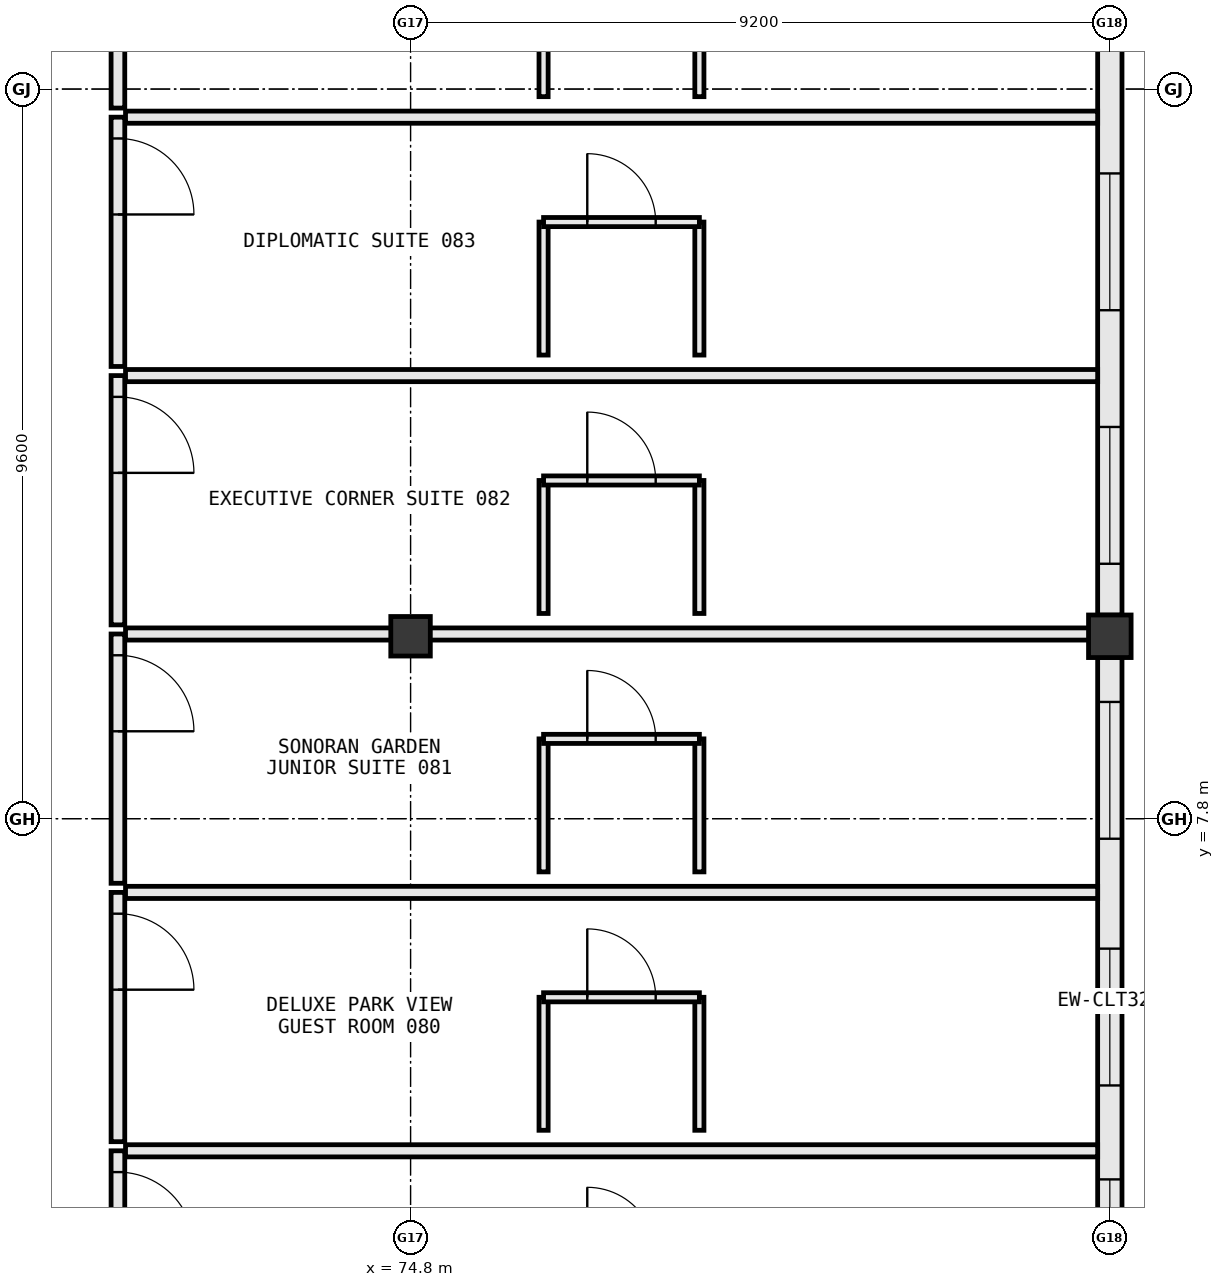
"""IFC4 building model, lengths in metres.
Left out: names, types, materials, properties, quantities, classifications, styles, units other than length and angle.
Written with IfcOpenShell. Run it as: python <this file> out.ifc"""

import sys

from ifc_helpers import new_model, si_unit, direction, frame, frame_2d, origin, origin_2d, place, context, subcontext, project, spatial, rectangle, extrude, element, fill, save


model = new_model("IFC4")
c1 = context("Model", 3, precision=1e-05, world=origin(), true_north=direction((0.0, 1.0)))
c2 = subcontext(c1, "Body", "Model", "MODEL_VIEW")
j1 = project(units=[si_unit("LENGTHUNIT", "METRE"), si_unit("PLANEANGLEUNIT", "RADIAN")], contexts=[c1])
p1 = place(None, origin())
s1 = spatial("IfcSite", under=j1, at=p1, CompositionType="ELEMENT")
p2 = place(p1, origin())
s2 = spatial("IfcBuilding", under=s1, at=p2, CompositionType="ELEMENT")
p3 = place(p2, frame((0.0, 0.0, 16.2)))
s3 = spatial("IfcBuildingStorey", under=s2, at=p3, CompositionType="ELEMENT", Elevation=16.2)
p4 = place(p3, frame((74.8, 10.2, 0.0), z_axis=(0.0, 0.0, 1.0), x_axis=(1.0, 0.0, 0.0)))
e1 = element("IfcColumn", 1, at=p4, inside=s3, PredefinedType="COLUMN", context=c2, shape_type="SweptSolid", body=[
    extrude(rectangle(XDim=0.52, YDim=0.52, at=origin_2d()), origin(), (0.0, 0.0, 1.0), 3.8),
])
p5 = place(p3, frame((84.0, 10.2, 0.0), z_axis=(0.0, 0.0, 1.0), x_axis=(1.0, 0.0, 0.0)))
e2 = element("IfcColumn", 2, at=p5, inside=s3, PredefinedType="COLUMN", context=c2, shape_type="SweptSolid", body=[
    extrude(rectangle(XDim=0.56, YDim=0.56, at=origin_2d()), origin(), (0.0, 0.0, 1.0), 3.8),
])
p6 = place(p3, frame((84.0, 0.878, 0.0), z_axis=(0.0, 0.0, 1.0), x_axis=(0.0, 1.0, 0.0)))
e3 = element("IfcWall", 3, at=p6, inside=s3, PredefinedType="STANDARD", context=c2, shape_type="SweptSolid", body=[
    extrude(rectangle(XDim=9.044, YDim=0.32, at=frame_2d((4.522, 0.0))), origin(), (0.0, 0.0, 1.0), 2.975),
])
p7 = place(p6, frame((0.376, 0.0, 0.85)))
e4 = element("IfcOpeningElement", 4, at=p7, cuts=e3, PredefinedType="OPENING", context=c2, shape_type="SweptSolid", body=[
    extrude(rectangle(XDim=1.8, YDim=1.85, at=frame_2d((0.9, 0.925))), frame((0.0, 0.172, 0.0), z_axis=(0.0, -1.0, 0.0), x_axis=(1.0, 0.0, 0.0)), (0.0, 0.0, 1.0), 0.344),
])
p8 = place(p6, frame((3.412, 0.0, 0.85)))
e5 = element("IfcOpeningElement", 5, at=p8, cuts=e3, PredefinedType="OPENING", context=c2, shape_type="SweptSolid", body=[
    extrude(rectangle(XDim=1.8, YDim=1.85, at=frame_2d((0.9, 0.925))), frame((0.0, 0.172, 0.0), z_axis=(0.0, -1.0, 0.0), x_axis=(1.0, 0.0, 0.0)), (0.0, 0.0, 1.0), 0.344),
])
p9 = place(p6, frame((6.658, 0.0, 0.85)))
e6 = element("IfcOpeningElement", 6, at=p9, cuts=e3, PredefinedType="OPENING", context=c2, shape_type="SweptSolid", body=[
    extrude(rectangle(XDim=1.8, YDim=1.85, at=frame_2d((0.9, 0.925))), frame((0.0, 0.172, 0.0), z_axis=(0.0, -1.0, 0.0), x_axis=(1.0, 0.0, 0.0)), (0.0, 0.0, 1.0), 0.344),
])
p10 = place(p3, frame((84.0, 10.478, 0.0), z_axis=(0.0, 0.0, 1.0), x_axis=(0.0, 1.0, 0.0)))
e7 = element("IfcWall", 7, at=p10, inside=s3, PredefinedType="STANDARD", context=c2, shape_type="SweptSolid", body=[
    extrude(rectangle(XDim=7.844, YDim=0.32, at=frame_2d((3.922, 0.0))), origin(), (0.0, 0.0, 1.0), 2.975),
])
p11 = place(p10, frame((0.676, 0.0, 0.85)))
e8 = element("IfcOpeningElement", 8, at=p11, cuts=e7, PredefinedType="OPENING", context=c2, shape_type="SweptSolid", body=[
    extrude(rectangle(XDim=1.8, YDim=1.85, at=frame_2d((0.9, 0.925))), frame((0.0, 0.172, 0.0), z_axis=(0.0, -1.0, 0.0), x_axis=(1.0, 0.0, 0.0)), (0.0, 0.0, 1.0), 0.344),
])
p12 = place(p10, frame((4.012, 0.0, 0.85)))
e9 = element("IfcOpeningElement", 9, at=p12, cuts=e7, PredefinedType="OPENING", context=c2, shape_type="SweptSolid", body=[
    extrude(rectangle(XDim=1.8, YDim=1.85, at=frame_2d((0.9, 0.925))), frame((0.0, 0.172, 0.0), z_axis=(0.0, -1.0, 0.0), x_axis=(1.0, 0.0, 0.0)), (0.0, 0.0, 1.0), 0.344),
])
p13 = place(p3, frame((70.95, 3.43, 0.0), z_axis=(0.0, 0.0, 1.0), x_axis=(0.0, -1.0, 0.0)))
e10 = element("IfcWall", 10, at=p13, inside=s3, PredefinedType="PARTITIONING", context=c2, shape_type="SweptSolid", body=[
    extrude(rectangle(XDim=3.28, YDim=0.18, at=frame_2d((1.64, 0.0))), origin(), (0.0, 0.0, 1.0), 3.56),
])
p14 = place(p13, frame((0.28, 0.0, 0.0)))
e11 = element("IfcOpeningElement", 11, at=p14, cuts=e10, PredefinedType="OPENING", context=c2, shape_type="SweptSolid", body=[
    extrude(rectangle(XDim=1.0, YDim=2.2, at=frame_2d((0.5, 1.1))), frame((0.0, 0.102, 0.0), z_axis=(0.0, -1.0, 0.0), x_axis=(1.0, 0.0, 0.0)), (0.0, 0.0, 1.0), 0.204),
])
p15 = place(p3, frame((71.05, 3.43, 0.0), z_axis=(0.0, 0.0, 1.0), x_axis=(1.0, 0.0, 0.0)))
e12 = element("IfcWall", 12, at=p15, inside=s3, PredefinedType="PARTITIONING", context=c2, shape_type="SweptSolid", body=[
    extrude(rectangle(XDim=12.79, YDim=0.16, at=frame_2d((6.395, 0.0))), origin(), (0.0, 0.0, 1.0), 3.56),
])
p16 = place(p3, frame((70.95, 6.83, 0.0), z_axis=(0.0, 0.0, 1.0), x_axis=(0.0, -1.0, 0.0)))
e13 = element("IfcWall", 13, at=p16, inside=s3, PredefinedType="PARTITIONING", context=c2, shape_type="SweptSolid", body=[
    extrude(rectangle(XDim=3.28, YDim=0.18, at=frame_2d((1.64, 0.0))), origin(), (0.0, 0.0, 1.0), 3.56),
])
p17 = place(p16, frame((0.28, 0.0, 0.0)))
e14 = element("IfcOpeningElement", 14, at=p17, cuts=e13, PredefinedType="OPENING", context=c2, shape_type="SweptSolid", body=[
    extrude(rectangle(XDim=1.0, YDim=2.2, at=frame_2d((0.5, 1.1))), frame((0.0, 0.102, 0.0), z_axis=(0.0, -1.0, 0.0), x_axis=(1.0, 0.0, 0.0)), (0.0, 0.0, 1.0), 0.204),
])
p18 = place(p3, frame((71.05, 6.83, 0.0), z_axis=(0.0, 0.0, 1.0), x_axis=(1.0, 0.0, 0.0)))
e15 = element("IfcWall", 15, at=p18, inside=s3, PredefinedType="PARTITIONING", context=c2, shape_type="SweptSolid", body=[
    extrude(rectangle(XDim=12.79, YDim=0.16, at=frame_2d((6.395, 0.0))), origin(), (0.0, 0.0, 1.0), 3.56),
])
for number, where, z_axis, x_axis in (
    (16, (76.55, 3.7, 0.0), (0.0, 0.0, 1.0), (0.0, 1.0, 0.0)),
    (17, (78.6, 3.7, 0.0), (0.0, 0.0, 1.0), (0.0, 1.0, 0.0)),
):
    element("IfcWall", number, at=place(p3, frame(where, z_axis=z_axis, x_axis=x_axis)), inside=s3, PredefinedType="PARTITIONING", context=c2, shape_type="SweptSolid", body=[
        extrude(rectangle(XDim=1.75, YDim=0.12, at=frame_2d((0.875, 0.0))), origin(), (0.0, 0.0, 1.0), 3.56),
    ])
p19 = place(p3, frame((76.55, 5.45, 0.0), z_axis=(0.0, 0.0, 1.0), x_axis=(1.0, 0.0, 0.0)))
e18 = element("IfcWall", 18, at=p19, inside=s3, PredefinedType="PARTITIONING", context=c2, shape_type="SweptSolid", body=[
    extrude(rectangle(XDim=2.05, YDim=0.12, at=frame_2d((1.025, 0.0))), origin(), (0.0, 0.0, 1.0), 3.56),
])
p20 = place(p19, frame((0.575, 0.0, 0.0)))
e19 = element("IfcOpeningElement", 19, at=p20, cuts=e18, PredefinedType="OPENING", context=c2, shape_type="SweptSolid", body=[
    extrude(rectangle(XDim=0.9, YDim=2.15, at=frame_2d((0.45, 1.075))), frame((0.0, 0.072, 0.0), z_axis=(0.0, -1.0, 0.0), x_axis=(1.0, 0.0, 0.0)), (0.0, 0.0, 1.0), 0.144),
])
p21 = place(p3, frame((70.95, 10.23, 0.0), z_axis=(0.0, 0.0, 1.0), x_axis=(0.0, -1.0, 0.0)))
e20 = element("IfcWall", 20, at=p21, inside=s3, PredefinedType="PARTITIONING", context=c2, shape_type="SweptSolid", body=[
    extrude(rectangle(XDim=3.28, YDim=0.18, at=frame_2d((1.64, 0.0))), origin(), (0.0, 0.0, 1.0), 3.56),
])
p22 = place(p21, frame((0.28, 0.0, 0.0)))
e21 = element("IfcOpeningElement", 21, at=p22, cuts=e20, PredefinedType="OPENING", context=c2, shape_type="SweptSolid", body=[
    extrude(rectangle(XDim=1.0, YDim=2.2, at=frame_2d((0.5, 1.1))), frame((0.0, 0.102, 0.0), z_axis=(0.0, -1.0, 0.0), x_axis=(1.0, 0.0, 0.0)), (0.0, 0.0, 1.0), 0.204),
])
p23 = place(p3, frame((71.05, 10.23, 0.0), z_axis=(0.0, 0.0, 1.0), x_axis=(1.0, 0.0, 0.0)))
e22 = element("IfcWall", 22, at=p23, inside=s3, PredefinedType="PARTITIONING", context=c2, shape_type="SweptSolid", body=[
    extrude(rectangle(XDim=12.79, YDim=0.16, at=frame_2d((6.395, 0.0))), origin(), (0.0, 0.0, 1.0), 2.915),
])
for number, where, z_axis, x_axis in (
    (23, (76.55, 7.1, 0.0), (0.0, 0.0, 1.0), (0.0, 1.0, 0.0)),
    (24, (78.6, 7.1, 0.0), (0.0, 0.0, 1.0), (0.0, 1.0, 0.0)),
):
    element("IfcWall", number, at=place(p3, frame(where, z_axis=z_axis, x_axis=x_axis)), inside=s3, PredefinedType="PARTITIONING", context=c2, shape_type="SweptSolid", body=[
        extrude(rectangle(XDim=1.75, YDim=0.12, at=frame_2d((0.875, 0.0))), origin(), (0.0, 0.0, 1.0), 3.56),
    ])
p24 = place(p3, frame((76.55, 8.85, 0.0), z_axis=(0.0, 0.0, 1.0), x_axis=(1.0, 0.0, 0.0)))
e25 = element("IfcWall", 25, at=p24, inside=s3, PredefinedType="PARTITIONING", context=c2, shape_type="SweptSolid", body=[
    extrude(rectangle(XDim=2.05, YDim=0.12, at=frame_2d((1.025, 0.0))), origin(), (0.0, 0.0, 1.0), 3.56),
])
p25 = place(p24, frame((0.575, 0.0, 0.0)))
e26 = element("IfcOpeningElement", 26, at=p25, cuts=e25, PredefinedType="OPENING", context=c2, shape_type="SweptSolid", body=[
    extrude(rectangle(XDim=0.9, YDim=2.15, at=frame_2d((0.45, 1.075))), frame((0.0, 0.072, 0.0), z_axis=(0.0, -1.0, 0.0), x_axis=(1.0, 0.0, 0.0)), (0.0, 0.0, 1.0), 0.144),
])
p26 = place(p3, frame((70.95, 13.63, 0.0), z_axis=(0.0, 0.0, 1.0), x_axis=(0.0, -1.0, 0.0)))
e27 = element("IfcWall", 27, at=p26, inside=s3, PredefinedType="PARTITIONING", context=c2, shape_type="SweptSolid", body=[
    extrude(rectangle(XDim=3.28, YDim=0.18, at=frame_2d((1.64, 0.0))), origin(), (0.0, 0.0, 1.0), 3.56),
])
p27 = place(p26, frame((0.28, 0.0, 0.0)))
e28 = element("IfcOpeningElement", 28, at=p27, cuts=e27, PredefinedType="OPENING", context=c2, shape_type="SweptSolid", body=[
    extrude(rectangle(XDim=1.0, YDim=2.2, at=frame_2d((0.5, 1.1))), frame((0.0, 0.102, 0.0), z_axis=(0.0, -1.0, 0.0), x_axis=(1.0, 0.0, 0.0)), (0.0, 0.0, 1.0), 0.204),
])
p28 = place(p3, frame((71.05, 13.63, 0.0), z_axis=(0.0, 0.0, 1.0), x_axis=(1.0, 0.0, 0.0)))
e29 = element("IfcWall", 29, at=p28, inside=s3, PredefinedType="PARTITIONING", context=c2, shape_type="SweptSolid", body=[
    extrude(rectangle(XDim=12.79, YDim=0.16, at=frame_2d((6.395, 0.0))), origin(), (0.0, 0.0, 1.0), 3.56),
])
for number, where, z_axis, x_axis in (
    (30, (76.55, 10.5, 0.0), (0.0, 0.0, 1.0), (0.0, 1.0, 0.0)),
    (31, (78.6, 10.5, 0.0), (0.0, 0.0, 1.0), (0.0, 1.0, 0.0)),
):
    element("IfcWall", number, at=place(p3, frame(where, z_axis=z_axis, x_axis=x_axis)), inside=s3, PredefinedType="PARTITIONING", context=c2, shape_type="SweptSolid", body=[
        extrude(rectangle(XDim=1.75, YDim=0.12, at=frame_2d((0.875, 0.0))), origin(), (0.0, 0.0, 1.0), 3.56),
    ])
p29 = place(p3, frame((76.55, 12.25, 0.0), z_axis=(0.0, 0.0, 1.0), x_axis=(1.0, 0.0, 0.0)))
e32 = element("IfcWall", 32, at=p29, inside=s3, PredefinedType="PARTITIONING", context=c2, shape_type="SweptSolid", body=[
    extrude(rectangle(XDim=2.05, YDim=0.12, at=frame_2d((1.025, 0.0))), origin(), (0.0, 0.0, 1.0), 3.56),
])
p30 = place(p29, frame((0.575, 0.0, 0.0)))
e33 = element("IfcOpeningElement", 33, at=p30, cuts=e32, PredefinedType="OPENING", context=c2, shape_type="SweptSolid", body=[
    extrude(rectangle(XDim=0.9, YDim=2.15, at=frame_2d((0.45, 1.075))), frame((0.0, 0.072, 0.0), z_axis=(0.0, -1.0, 0.0), x_axis=(1.0, 0.0, 0.0)), (0.0, 0.0, 1.0), 0.144),
])
p31 = place(p3, frame((70.95, 17.03, 0.0), z_axis=(0.0, 0.0, 1.0), x_axis=(0.0, -1.0, 0.0)))
e34 = element("IfcWall", 34, at=p31, inside=s3, PredefinedType="PARTITIONING", context=c2, shape_type="SweptSolid", body=[
    extrude(rectangle(XDim=3.28, YDim=0.18, at=frame_2d((1.64, 0.0))), origin(), (0.0, 0.0, 1.0), 3.56),
])
p32 = place(p31, frame((0.28, 0.0, 0.0)))
e35 = element("IfcOpeningElement", 35, at=p32, cuts=e34, PredefinedType="OPENING", context=c2, shape_type="SweptSolid", body=[
    extrude(rectangle(XDim=1.0, YDim=2.2, at=frame_2d((0.5, 1.1))), frame((0.0, 0.102, 0.0), z_axis=(0.0, -1.0, 0.0), x_axis=(1.0, 0.0, 0.0)), (0.0, 0.0, 1.0), 0.204),
])
p33 = place(p3, frame((71.05, 17.03, 0.0), z_axis=(0.0, 0.0, 1.0), x_axis=(1.0, 0.0, 0.0)))
e36 = element("IfcWall", 36, at=p33, inside=s3, PredefinedType="PARTITIONING", context=c2, shape_type="SweptSolid", body=[
    extrude(rectangle(XDim=12.79, YDim=0.16, at=frame_2d((6.395, 0.0))), origin(), (0.0, 0.0, 1.0), 3.56),
])
for number, where, z_axis, x_axis in (
    (37, (76.55, 13.9, 0.0), (0.0, 0.0, 1.0), (0.0, 1.0, 0.0)),
    (38, (78.6, 13.9, 0.0), (0.0, 0.0, 1.0), (0.0, 1.0, 0.0)),
):
    element("IfcWall", number, at=place(p3, frame(where, z_axis=z_axis, x_axis=x_axis)), inside=s3, PredefinedType="PARTITIONING", context=c2, shape_type="SweptSolid", body=[
        extrude(rectangle(XDim=1.75, YDim=0.12, at=frame_2d((0.875, 0.0))), origin(), (0.0, 0.0, 1.0), 3.56),
    ])
p34 = place(p3, frame((76.55, 15.65, 0.0), z_axis=(0.0, 0.0, 1.0), x_axis=(1.0, 0.0, 0.0)))
e39 = element("IfcWall", 39, at=p34, inside=s3, PredefinedType="PARTITIONING", context=c2, shape_type="SweptSolid", body=[
    extrude(rectangle(XDim=2.05, YDim=0.12, at=frame_2d((1.025, 0.0))), origin(), (0.0, 0.0, 1.0), 3.56),
])
p35 = place(p34, frame((0.575, 0.0, 0.0)))
e40 = element("IfcOpeningElement", 40, at=p35, cuts=e39, PredefinedType="OPENING", context=c2, shape_type="SweptSolid", body=[
    extrude(rectangle(XDim=0.9, YDim=2.15, at=frame_2d((0.45, 1.075))), frame((0.0, 0.072, 0.0), z_axis=(0.0, -1.0, 0.0), x_axis=(1.0, 0.0, 0.0)), (0.0, 0.0, 1.0), 0.144),
])
p36 = place(p3, frame((70.95, 20.43, 0.0), z_axis=(0.0, 0.0, 1.0), x_axis=(0.0, -1.0, 0.0)))
e41 = element("IfcWall", 41, at=p36, inside=s3, PredefinedType="PARTITIONING", context=c2, shape_type="SweptSolid", body=[
    extrude(rectangle(XDim=3.28, YDim=0.18, at=frame_2d((1.64, 0.0))), origin(), (0.0, 0.0, 1.0), 3.56),
])
p37 = place(p36, frame((0.28, 0.0, 0.0)))
e42 = element("IfcOpeningElement", 42, at=p37, cuts=e41, PredefinedType="OPENING", context=c2, shape_type="SweptSolid", body=[
    extrude(rectangle(XDim=1.0, YDim=2.2, at=frame_2d((0.5, 1.1))), frame((0.0, 0.102, 0.0), z_axis=(0.0, -1.0, 0.0), x_axis=(1.0, 0.0, 0.0)), (0.0, 0.0, 1.0), 0.204),
])
for number, where, z_axis, x_axis in (
    (43, (76.55, 17.3, 0.0), (0.0, 0.0, 1.0), (0.0, 1.0, 0.0)),
    (44, (78.6, 17.3, 0.0), (0.0, 0.0, 1.0), (0.0, 1.0, 0.0)),
):
    element("IfcWall", number, at=place(p3, frame(where, z_axis=z_axis, x_axis=x_axis)), inside=s3, PredefinedType="PARTITIONING", context=c2, shape_type="SweptSolid", body=[
        extrude(rectangle(XDim=1.75, YDim=0.12, at=frame_2d((0.875, 0.0))), origin(), (0.0, 0.0, 1.0), 3.56),
    ])
p38 = place(p7, origin())
e45 = element("IfcWindow", 45, at=p38, inside=s3, PartitioningType="SINGLE_PANEL", PredefinedType="WINDOW", context=c2, shape_type="SweptSolid", body=[
    extrude(rectangle(XDim=1.8, YDim=1.85, at=frame_2d((0.9, 0.925))), frame((0.0, 0.03, 0.0), z_axis=(0.0, -1.0, 0.0), x_axis=(1.0, 0.0, 0.0)), (0.0, 0.0, 1.0), 0.06),
])
fill(e4, e45)
p39 = place(p8, origin())
e46 = element("IfcWindow", 46, at=p39, inside=s3, PartitioningType="SINGLE_PANEL", PredefinedType="WINDOW", context=c2, shape_type="SweptSolid", body=[
    extrude(rectangle(XDim=1.8, YDim=1.85, at=frame_2d((0.9, 0.925))), frame((0.0, 0.03, 0.0), z_axis=(0.0, -1.0, 0.0), x_axis=(1.0, 0.0, 0.0)), (0.0, 0.0, 1.0), 0.06),
])
fill(e5, e46)
p40 = place(p9, origin())
e47 = element("IfcWindow", 47, at=p40, inside=s3, PartitioningType="SINGLE_PANEL", PredefinedType="WINDOW", context=c2, shape_type="SweptSolid", body=[
    extrude(rectangle(XDim=1.8, YDim=1.85, at=frame_2d((0.9, 0.925))), frame((0.0, 0.03, 0.0), z_axis=(0.0, -1.0, 0.0), x_axis=(1.0, 0.0, 0.0)), (0.0, 0.0, 1.0), 0.06),
])
fill(e6, e47)
p41 = place(p11, origin())
e48 = element("IfcWindow", 48, at=p41, inside=s3, PartitioningType="SINGLE_PANEL", PredefinedType="WINDOW", context=c2, shape_type="SweptSolid", body=[
    extrude(rectangle(XDim=1.8, YDim=1.85, at=frame_2d((0.9, 0.925))), frame((0.0, 0.03, 0.0), z_axis=(0.0, -1.0, 0.0), x_axis=(1.0, 0.0, 0.0)), (0.0, 0.0, 1.0), 0.06),
])
fill(e8, e48)
p42 = place(p12, origin())
e49 = element("IfcWindow", 49, at=p42, inside=s3, PartitioningType="SINGLE_PANEL", PredefinedType="WINDOW", context=c2, shape_type="SweptSolid", body=[
    extrude(rectangle(XDim=1.8, YDim=1.85, at=frame_2d((0.9, 0.925))), frame((0.0, 0.03, 0.0), z_axis=(0.0, -1.0, 0.0), x_axis=(1.0, 0.0, 0.0)), (0.0, 0.0, 1.0), 0.06),
])
fill(e9, e49)
p43 = place(p14, origin())
e50 = element("IfcDoor", 50, at=p43, inside=s3, OperationType="SINGLE_SWING_RIGHT", PredefinedType="DOOR", context=c2, shape_type="SweptSolid", body=[
    extrude(rectangle(XDim=1.0, YDim=2.2, at=frame_2d((0.5, 1.1))), frame((0.0, 0.025, 0.0), z_axis=(0.0, -1.0, 0.0), x_axis=(1.0, 0.0, 0.0)), (0.0, 0.0, 1.0), 0.05),
])
fill(e11, e50)
p44 = place(p17, origin())
e51 = element("IfcDoor", 51, at=p44, inside=s3, OperationType="SINGLE_SWING_RIGHT", PredefinedType="DOOR", context=c2, shape_type="SweptSolid", body=[
    extrude(rectangle(XDim=1.0, YDim=2.2, at=frame_2d((0.5, 1.1))), frame((0.0, 0.025, 0.0), z_axis=(0.0, -1.0, 0.0), x_axis=(1.0, 0.0, 0.0)), (0.0, 0.0, 1.0), 0.05),
])
fill(e14, e51)
p45 = place(p20, origin())
e52 = element("IfcDoor", 52, at=p45, inside=s3, OperationType="SINGLE_SWING_LEFT", PredefinedType="DOOR", context=c2, shape_type="SweptSolid", body=[
    extrude(rectangle(XDim=0.9, YDim=2.15, at=frame_2d((0.45, 1.075))), frame((0.0, 0.025, 0.0), z_axis=(0.0, -1.0, 0.0), x_axis=(1.0, 0.0, 0.0)), (0.0, 0.0, 1.0), 0.05),
])
fill(e19, e52)
p46 = place(p22, origin())
e53 = element("IfcDoor", 53, at=p46, inside=s3, OperationType="SINGLE_SWING_RIGHT", PredefinedType="DOOR", context=c2, shape_type="SweptSolid", body=[
    extrude(rectangle(XDim=1.0, YDim=2.2, at=frame_2d((0.5, 1.1))), frame((0.0, 0.025, 0.0), z_axis=(0.0, -1.0, 0.0), x_axis=(1.0, 0.0, 0.0)), (0.0, 0.0, 1.0), 0.05),
])
fill(e21, e53)
p47 = place(p25, origin())
e54 = element("IfcDoor", 54, at=p47, inside=s3, OperationType="SINGLE_SWING_LEFT", PredefinedType="DOOR", context=c2, shape_type="SweptSolid", body=[
    extrude(rectangle(XDim=0.9, YDim=2.15, at=frame_2d((0.45, 1.075))), frame((0.0, 0.025, 0.0), z_axis=(0.0, -1.0, 0.0), x_axis=(1.0, 0.0, 0.0)), (0.0, 0.0, 1.0), 0.05),
])
fill(e26, e54)
p48 = place(p27, origin())
e55 = element("IfcDoor", 55, at=p48, inside=s3, OperationType="SINGLE_SWING_RIGHT", PredefinedType="DOOR", context=c2, shape_type="SweptSolid", body=[
    extrude(rectangle(XDim=1.0, YDim=2.2, at=frame_2d((0.5, 1.1))), frame((0.0, 0.025, 0.0), z_axis=(0.0, -1.0, 0.0), x_axis=(1.0, 0.0, 0.0)), (0.0, 0.0, 1.0), 0.05),
])
fill(e28, e55)
p49 = place(p30, origin())
e56 = element("IfcDoor", 56, at=p49, inside=s3, OperationType="SINGLE_SWING_LEFT", PredefinedType="DOOR", context=c2, shape_type="SweptSolid", body=[
    extrude(rectangle(XDim=0.9, YDim=2.15, at=frame_2d((0.45, 1.075))), frame((0.0, 0.025, 0.0), z_axis=(0.0, -1.0, 0.0), x_axis=(1.0, 0.0, 0.0)), (0.0, 0.0, 1.0), 0.05),
])
fill(e33, e56)
p50 = place(p32, origin())
e57 = element("IfcDoor", 57, at=p50, inside=s3, OperationType="SINGLE_SWING_RIGHT", PredefinedType="DOOR", context=c2, shape_type="SweptSolid", body=[
    extrude(rectangle(XDim=1.0, YDim=2.2, at=frame_2d((0.5, 1.1))), frame((0.0, 0.025, 0.0), z_axis=(0.0, -1.0, 0.0), x_axis=(1.0, 0.0, 0.0)), (0.0, 0.0, 1.0), 0.05),
])
fill(e35, e57)
p51 = place(p35, origin())
e58 = element("IfcDoor", 58, at=p51, inside=s3, OperationType="SINGLE_SWING_LEFT", PredefinedType="DOOR", context=c2, shape_type="SweptSolid", body=[
    extrude(rectangle(XDim=0.9, YDim=2.15, at=frame_2d((0.45, 1.075))), frame((0.0, 0.025, 0.0), z_axis=(0.0, -1.0, 0.0), x_axis=(1.0, 0.0, 0.0)), (0.0, 0.0, 1.0), 0.05),
])
fill(e40, e58)
save(model, sys.argv[1])
